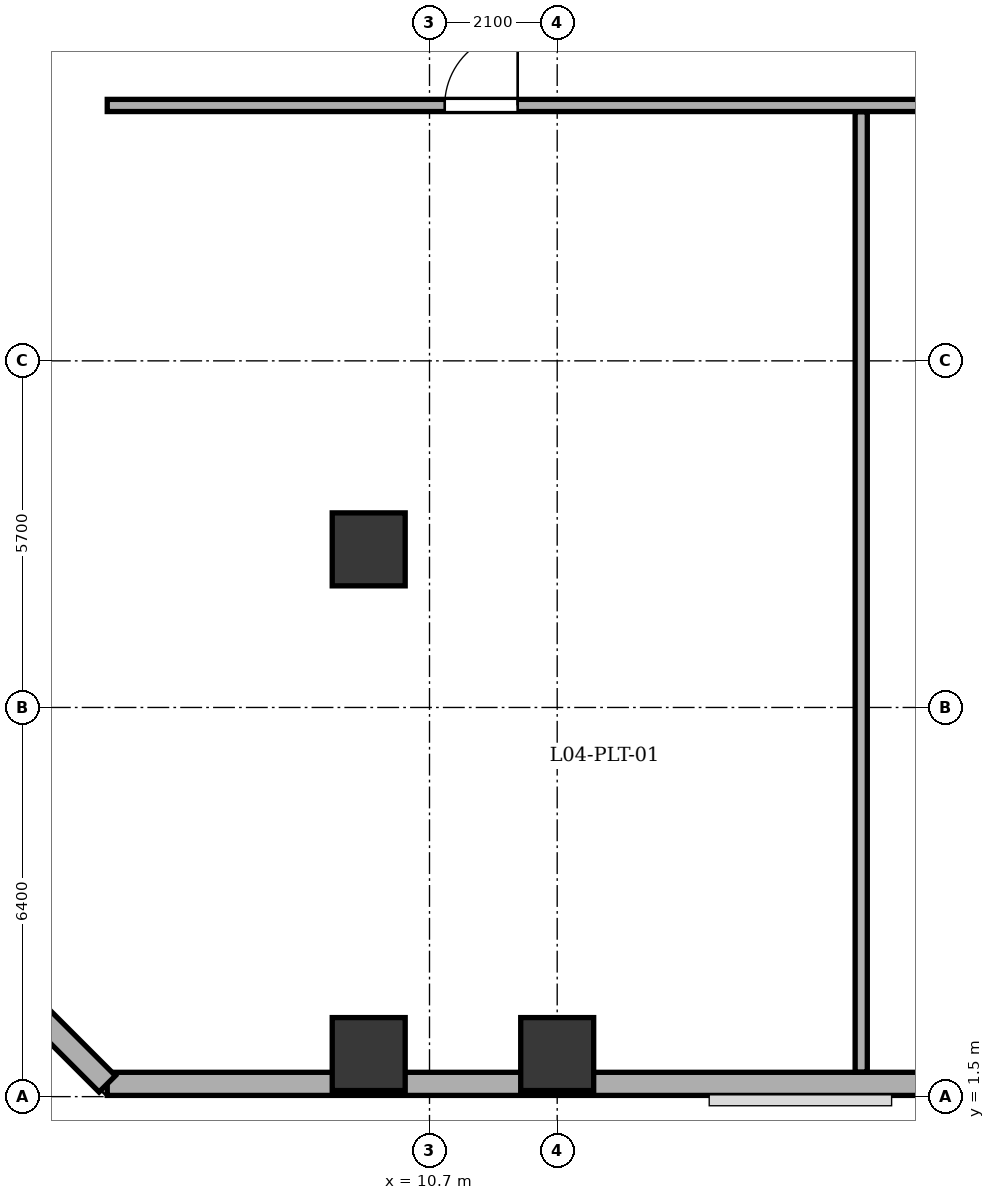
"""IFC4 building model, lengths in metres.
Left out: names, types, materials, properties, quantities, classifications, styles, units other than length and angle.
Written with IfcOpenShell. Run it as: python <this file> out.ifc"""

import sys

from ifc_helpers import new_model, si_unit, direction, frame, frame_2d, origin, origin_2d, place, context, subcontext, project, spatial, rectangle, extrude, element, fill, save


model = new_model("IFC4")
c1 = context("Model", 3, precision=1e-05, world=origin(), true_north=direction((0.0, 1.0)))
c2 = subcontext(c1, "Body", "Model", "MODEL_VIEW")
j1 = project(units=[si_unit("LENGTHUNIT", "METRE"), si_unit("PLANEANGLEUNIT", "RADIAN")], contexts=[c1])
p1 = place(None, origin())
s1 = spatial("IfcSite", under=j1, at=p1, CompositionType="ELEMENT")
p2 = place(p1, origin())
s2 = spatial("IfcBuilding", under=s1, at=p2, CompositionType="ELEMENT")
p3 = place(p2, frame((0.0, 0.0, 18.9)))
s3 = spatial("IfcBuildingStorey", under=s2, at=p3, CompositionType="ELEMENT", Elevation=18.9)
for number, where, z_axis, x_axis in (
    (1, (9.7, 2.2, 0.0), (0.0, 0.0, 1.0), (1.0, 0.0, 0.0)),
    (2, (12.8, 2.2, 0.0), (0.0, 0.0, 1.0), (1.0, 0.0, 0.0)),
    (3, (9.7, 10.5, 0.0), (0.0, 0.0, 1.0), (1.0, 0.0, 0.0)),
):
    element("IfcColumn", number, at=place(p3, frame(where, z_axis=z_axis, x_axis=x_axis)), inside=s3, PredefinedType="COLUMN", context=c2, shape_type="SweptSolid", body=[
        extrude(rectangle(XDim=1.2, YDim=1.2, at=origin_2d()), origin(), (0.0, 0.0, 1.0), 5.4),
    ])
p4 = place(p3, frame((55.0, 1.71, 0.0), z_axis=(0.0, 0.0, 1.0), x_axis=(-1.0, 0.0, 0.0)))
e4 = element("IfcWall", 4, at=p4, inside=s3, PredefinedType="STANDARD", context=c2, shape_type="SweptSolid", body=[
    extrude(rectangle(XDim=49.6, YDim=0.38, at=frame_2d((24.8, 0.0))), origin(), (0.0, 0.0, 1.0), 4.95),
])
p5 = place(p3, frame((5.4, 1.71, 0.0), z_axis=(0.0, 0.0, 1.0), x_axis=(-0.707075841688, 0.707137719332, 0.0)))
e5 = element("IfcWall", 5, at=p5, inside=s3, PredefinedType="STANDARD", context=c2, shape_type="SweptSolid", body=[
    extrude(rectangle(XDim=3.946, YDim=0.38, at=frame_2d((1.973, 0.0))), origin(), (0.0, 0.0, 1.0), 4.95),
])
p6 = place(p3, frame((5.4, 17.8, 0.0), z_axis=(0.0, 0.0, 1.0), x_axis=(1.0, 0.0, 0.0)))
e6 = element("IfcWall", 6, at=p6, inside=s3, PredefinedType="SOLIDWALL", context=c2, shape_type="SweptSolid", body=[
    extrude(rectangle(XDim=49.6, YDim=0.2, at=frame_2d((24.8, 0.0))), origin(), (0.0, 0.0, 1.0), 4.95),
])
p7 = place(p6, frame((5.55, 0.0, 0.0)))
e7 = element("IfcOpeningElement", 7, at=p7, cuts=e6, PredefinedType="OPENING", context=c2, shape_type="SweptSolid", body=[
    extrude(rectangle(XDim=1.2, YDim=2.15, at=frame_2d((0.6, 1.075))), frame((0.0, 0.11, 0.0), z_axis=(0.0, -1.0, 0.0), x_axis=(1.0, 0.0, 0.0)), (0.0, 0.0, 1.0), 0.22),
])
p8 = place(p6, frame((15.25, 0.0, 0.0)))
e8 = element("IfcOpeningElement", 8, at=p8, cuts=e6, PredefinedType="OPENING", context=c2, shape_type="SweptSolid", body=[
    extrude(rectangle(XDim=1.2, YDim=2.15, at=frame_2d((0.6, 1.075))), frame((0.0, 0.11, 0.0), z_axis=(0.0, -1.0, 0.0), x_axis=(1.0, 0.0, 0.0)), (0.0, 0.0, 1.0), 0.22),
])
p9 = place(p6, frame((30.35, 0.0, 0.0)))
e9 = element("IfcOpeningElement", 9, at=p9, cuts=e6, PredefinedType="OPENING", context=c2, shape_type="SweptSolid", body=[
    extrude(rectangle(XDim=1.2, YDim=2.15, at=frame_2d((0.6, 1.075))), frame((0.0, 0.11, 0.0), z_axis=(0.0, -1.0, 0.0), x_axis=(1.0, 0.0, 0.0)), (0.0, 0.0, 1.0), 0.22),
])
p10 = place(p6, frame((42.75, 0.0, 0.0)))
e10 = element("IfcOpeningElement", 10, at=p10, cuts=e6, PredefinedType="OPENING", context=c2, shape_type="SweptSolid", body=[
    extrude(rectangle(XDim=1.2, YDim=2.15, at=frame_2d((0.6, 1.075))), frame((0.0, 0.11, 0.0), z_axis=(0.0, -1.0, 0.0), x_axis=(1.0, 0.0, 0.0)), (0.0, 0.0, 1.0), 0.22),
])
p11 = place(p6, frame((25.0, 0.0, 0.0)))
e11 = element("IfcOpeningElement", 11, at=p11, cuts=e6, PredefinedType="OPENING", context=c2, shape_type="SweptSolid", body=[
    extrude(rectangle(XDim=1.2, YDim=2.15, at=frame_2d((0.6, 1.075))), frame((0.0, 0.11, 0.0), z_axis=(0.0, -1.0, 0.0), x_axis=(1.0, 0.0, 0.0)), (0.0, 0.0, 1.0), 0.22),
])
p12 = place(p3, frame((17.8, 1.905, 0.0), z_axis=(0.0, 0.0, 1.0), x_axis=(0.0, 1.0, 0.0)))
e12 = element("IfcWall", 12, at=p12, inside=s3, PredefinedType="SOLIDWALL", context=c2, shape_type="SweptSolid", body=[
    extrude(rectangle(XDim=15.79, YDim=0.2, at=frame_2d((7.895, 0.0))), origin(), (0.0, 0.0, 1.0), 4.385),
])
p13 = place(p7, origin())
e13 = element("IfcDoor", 13, at=p13, inside=s3, OperationType="SINGLE_SWING_RIGHT", PredefinedType="DOOR", context=c2, shape_type="SweptSolid", body=[
    extrude(rectangle(XDim=1.2, YDim=2.15, at=frame_2d((0.6, 1.075))), frame((0.0, 0.025, 0.0), z_axis=(0.0, -1.0, 0.0), x_axis=(1.0, 0.0, 0.0)), (0.0, 0.0, 1.0), 0.05),
])
fill(e7, e13)
save(model, sys.argv[1])
